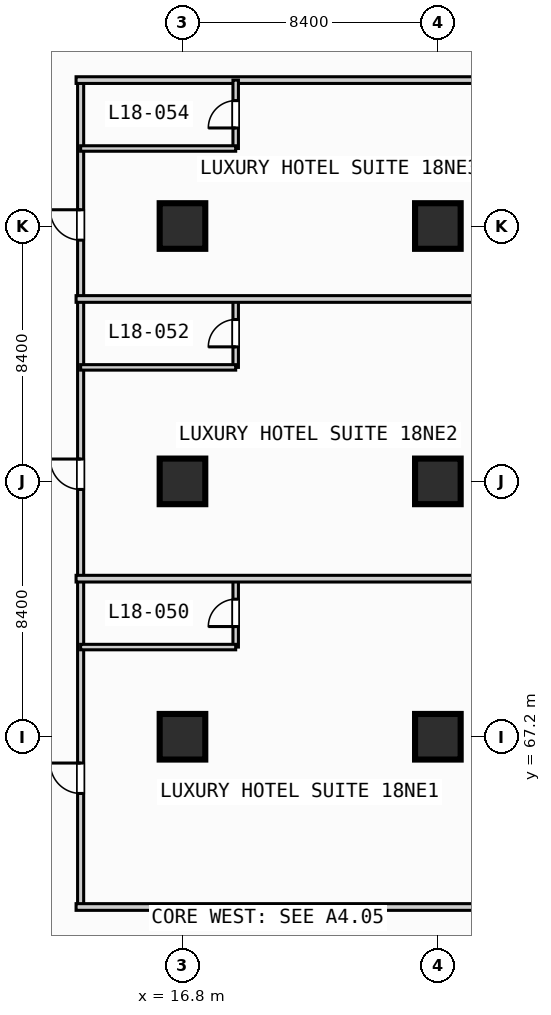
"""IFC4 building model, lengths in metres.
Left out: names, types, materials, properties, quantities, classifications, styles, units other than length and angle.
Written with IfcOpenShell. Run it as: python <this file> out.ifc"""

import sys

from ifc_helpers import new_model, si_unit, direction, frame, frame_2d, origin, origin_2d, place, context, subcontext, project, spatial, rectangle, extrude, element, fill, save


model = new_model("IFC4")
c1 = context("Model", 3, precision=1e-05, world=origin(), true_north=direction((0.0, 1.0)))
c2 = subcontext(c1, "Body", "Model", "MODEL_VIEW")
j1 = project(units=[si_unit("LENGTHUNIT", "METRE"), si_unit("PLANEANGLEUNIT", "RADIAN")], contexts=[c1])
p1 = place(None, origin())
s1 = spatial("IfcSite", under=j1, at=p1, CompositionType="ELEMENT")
p2 = place(p1, origin())
s2 = spatial("IfcBuilding", under=s1, at=p2, CompositionType="ELEMENT")
p3 = place(p2, frame((0.0, 0.0, 77.6)))
s3 = spatial("IfcBuildingStorey", under=s2, at=p3, CompositionType="ELEMENT", Elevation=77.6)
for number, where, z_axis, x_axis in (
    (1, (16.8, 67.2, 0.0), (0.0, 0.0, 1.0), (1.0, 0.0, 0.0)),
    (2, (16.8, 75.6, 0.0), (0.0, 0.0, 1.0), (1.0, 0.0, 0.0)),
    (3, (16.8, 84.0, 0.0), (0.0, 0.0, 1.0), (1.0, 0.0, 0.0)),
    (4, (25.2, 67.2, 0.0), (0.0, 0.0, 1.0), (1.0, 0.0, 0.0)),
    (5, (25.2, 75.6, 0.0), (0.0, 0.0, 1.0), (1.0, 0.0, 0.0)),
    (6, (25.2, 84.0, 0.0), (0.0, 0.0, 1.0), (1.0, 0.0, 0.0)),
):
    element("IfcColumn", number, at=place(p3, frame(where, z_axis=z_axis, x_axis=x_axis)), inside=s3, PredefinedType="COLUMN", context=c2, shape_type="SweptSolid", body=[
        extrude(rectangle(XDim=1.5, YDim=1.5, at=origin_2d()), origin(), (0.0, 0.0, 1.0), 3.8),
    ])
p4 = place(p3, frame((13.45, 61.6, 0.0), z_axis=(0.0, 0.0, 1.0), x_axis=(0.0, 1.0, 0.0)))
e7 = element("IfcWall", 7, at=p4, inside=s3, PredefinedType="PARTITIONING", context=c2, shape_type="SweptSolid", body=[
    extrude(rectangle(XDim=27.2, YDim=0.2, at=frame_2d((13.6, 0.0))), origin(), (0.0, 0.0, 1.0), 3.55),
])
p5 = place(p4, frame((3.735, 0.0, 0.0)))
e8 = element("IfcOpeningElement", 8, at=p5, cuts=e7, PredefinedType="OPENING", context=c2, shape_type="SweptSolid", body=[
    extrude(rectangle(XDim=1.0, YDim=2.15, at=frame_2d((0.5, 1.075))), frame((0.0, 0.11, 0.0), z_axis=(0.0, -1.0, 0.0), x_axis=(1.0, 0.0, 0.0)), (0.0, 0.0, 1.0), 0.22),
])
p6 = place(p4, frame((13.735, 0.0, 0.0)))
e9 = element("IfcOpeningElement", 9, at=p6, cuts=e7, PredefinedType="OPENING", context=c2, shape_type="SweptSolid", body=[
    extrude(rectangle(XDim=1.0, YDim=2.15, at=frame_2d((0.5, 1.075))), frame((0.0, 0.11, 0.0), z_axis=(0.0, -1.0, 0.0), x_axis=(1.0, 0.0, 0.0)), (0.0, 0.0, 1.0), 0.22),
])
p7 = place(p4, frame((21.935, 0.0, 0.0)))
e10 = element("IfcOpeningElement", 10, at=p7, cuts=e7, PredefinedType="OPENING", context=c2, shape_type="SweptSolid", body=[
    extrude(rectangle(XDim=1.0, YDim=2.15, at=frame_2d((0.5, 1.075))), frame((0.0, 0.11, 0.0), z_axis=(0.0, -1.0, 0.0), x_axis=(1.0, 0.0, 0.0)), (0.0, 0.0, 1.0), 0.22),
])
p8 = place(p3, frame((13.3, 61.6, 0.0), z_axis=(0.0, 0.0, 1.0), x_axis=(1.0, 0.0, 0.0)))
e11 = element("IfcWall", 11, at=p8, inside=s3, PredefinedType="PARTITIONING", context=c2, shape_type="SweptSolid", body=[
    extrude(rectangle(XDim=20.13, YDim=0.22, at=frame_2d((10.065, 0.0))), origin(), (0.0, 0.0, 1.0), 3.55),
])
p9 = place(p3, frame((18.55, 70.15, 0.0), z_axis=(0.0, 0.0, 1.0), x_axis=(0.0, 1.0, 0.0)))
e12 = element("IfcWall", 12, at=p9, inside=s3, PredefinedType="PLUMBINGWALL", context=c2, shape_type="SweptSolid", body=[
    extrude(rectangle(XDim=2.25, YDim=0.18, at=frame_2d((1.125, 0.0))), origin(), (0.0, 0.0, 1.0), 3.55),
])
p10 = place(p9, frame((0.675, 0.0, 0.0)))
e13 = element("IfcOpeningElement", 13, at=p10, cuts=e12, PredefinedType="OPENING", context=c2, shape_type="SweptSolid", body=[
    extrude(rectangle(XDim=0.9, YDim=2.1, at=frame_2d((0.45, 1.05))), frame((0.0, 0.1, 0.0), z_axis=(0.0, -1.0, 0.0), x_axis=(1.0, 0.0, 0.0)), (0.0, 0.0, 1.0), 0.2),
])
p11 = place(p3, frame((13.45, 70.15, 0.0), z_axis=(0.0, 0.0, 1.0), x_axis=(1.0, 0.0, 0.0)))
e14 = element("IfcWall", 14, at=p11, inside=s3, PredefinedType="PLUMBINGWALL", context=c2, shape_type="SweptSolid", body=[
    extrude(rectangle(XDim=5.1, YDim=0.18, at=frame_2d((2.55, 0.0))), origin(), (0.0, 0.0, 1.0), 3.55),
])
p12 = place(p3, frame((13.3, 72.4, 0.0), z_axis=(0.0, 0.0, 1.0), x_axis=(1.0, 0.0, 0.0)))
e15 = element("IfcWall", 15, at=p12, inside=s3, PredefinedType="PARTITIONING", context=c2, shape_type="SweptSolid", body=[
    extrude(rectangle(XDim=20.13, YDim=0.22, at=frame_2d((10.065, 0.0))), origin(), (0.0, 0.0, 1.0), 3.55),
])
p13 = place(p3, frame((18.55, 79.35, 0.0), z_axis=(0.0, 0.0, 1.0), x_axis=(0.0, 1.0, 0.0)))
e16 = element("IfcWall", 16, at=p13, inside=s3, PredefinedType="PLUMBINGWALL", context=c2, shape_type="SweptSolid", body=[
    extrude(rectangle(XDim=2.25, YDim=0.18, at=frame_2d((1.125, 0.0))), origin(), (0.0, 0.0, 1.0), 3.55),
])
p14 = place(p13, frame((0.675, 0.0, 0.0)))
e17 = element("IfcOpeningElement", 17, at=p14, cuts=e16, PredefinedType="OPENING", context=c2, shape_type="SweptSolid", body=[
    extrude(rectangle(XDim=0.9, YDim=2.1, at=frame_2d((0.45, 1.05))), frame((0.0, 0.1, 0.0), z_axis=(0.0, -1.0, 0.0), x_axis=(1.0, 0.0, 0.0)), (0.0, 0.0, 1.0), 0.2),
])
p15 = place(p3, frame((13.45, 79.35, 0.0), z_axis=(0.0, 0.0, 1.0), x_axis=(1.0, 0.0, 0.0)))
e18 = element("IfcWall", 18, at=p15, inside=s3, PredefinedType="PLUMBINGWALL", context=c2, shape_type="SweptSolid", body=[
    extrude(rectangle(XDim=5.1, YDim=0.18, at=frame_2d((2.55, 0.0))), origin(), (0.0, 0.0, 1.0), 3.55),
])
for number, where, z_axis, x_axis in (
    (19, (13.3, 81.6, 0.0), (0.0, 0.0, 1.0), (1.0, 0.0, 0.0)),
    (20, (13.3, 88.8, 0.0), (0.0, 0.0, 1.0), (1.0, 0.0, 0.0)),
):
    element("IfcWall", number, at=place(p3, frame(where, z_axis=z_axis, x_axis=x_axis)), inside=s3, PredefinedType="PARTITIONING", context=c2, shape_type="SweptSolid", body=[
        extrude(rectangle(XDim=20.13, YDim=0.22, at=frame_2d((10.065, 0.0))), origin(), (0.0, 0.0, 1.0), 3.55),
    ])
p16 = place(p3, frame((18.55, 86.55, 0.0), z_axis=(0.0, 0.0, 1.0), x_axis=(0.0, 1.0, 0.0)))
e21 = element("IfcWall", 21, at=p16, inside=s3, PredefinedType="PLUMBINGWALL", context=c2, shape_type="SweptSolid", body=[
    extrude(rectangle(XDim=2.25, YDim=0.18, at=frame_2d((1.125, 0.0))), origin(), (0.0, 0.0, 1.0), 3.55),
])
p17 = place(p16, frame((0.675, 0.0, 0.0)))
e22 = element("IfcOpeningElement", 22, at=p17, cuts=e21, PredefinedType="OPENING", context=c2, shape_type="SweptSolid", body=[
    extrude(rectangle(XDim=0.9, YDim=2.1, at=frame_2d((0.45, 1.05))), frame((0.0, 0.1, 0.0), z_axis=(0.0, -1.0, 0.0), x_axis=(1.0, 0.0, 0.0)), (0.0, 0.0, 1.0), 0.2),
])
p18 = place(p3, frame((13.45, 86.55, 0.0), z_axis=(0.0, 0.0, 1.0), x_axis=(1.0, 0.0, 0.0)))
e23 = element("IfcWall", 23, at=p18, inside=s3, PredefinedType="PLUMBINGWALL", context=c2, shape_type="SweptSolid", body=[
    extrude(rectangle(XDim=5.1, YDim=0.18, at=frame_2d((2.55, 0.0))), origin(), (0.0, 0.0, 1.0), 3.55),
])
p19 = place(p5, origin())
e24 = element("IfcDoor", 24, at=p19, inside=s3, OperationType="SINGLE_SWING_RIGHT", PredefinedType="DOOR", context=c2, shape_type="SweptSolid", body=[
    extrude(rectangle(XDim=1.0, YDim=2.15, at=frame_2d((0.5, 1.075))), frame((0.0, 0.025, 0.0), z_axis=(0.0, -1.0, 0.0), x_axis=(1.0, 0.0, 0.0)), (0.0, 0.0, 1.0), 0.05),
])
fill(e8, e24)
p20 = place(p6, origin())
e25 = element("IfcDoor", 25, at=p20, inside=s3, OperationType="SINGLE_SWING_RIGHT", PredefinedType="DOOR", context=c2, shape_type="SweptSolid", body=[
    extrude(rectangle(XDim=1.0, YDim=2.15, at=frame_2d((0.5, 1.075))), frame((0.0, 0.025, 0.0), z_axis=(0.0, -1.0, 0.0), x_axis=(1.0, 0.0, 0.0)), (0.0, 0.0, 1.0), 0.05),
])
fill(e9, e25)
p21 = place(p7, origin())
e26 = element("IfcDoor", 26, at=p21, inside=s3, OperationType="SINGLE_SWING_RIGHT", PredefinedType="DOOR", context=c2, shape_type="SweptSolid", body=[
    extrude(rectangle(XDim=1.0, YDim=2.15, at=frame_2d((0.5, 1.075))), frame((0.0, 0.025, 0.0), z_axis=(0.0, -1.0, 0.0), x_axis=(1.0, 0.0, 0.0)), (0.0, 0.0, 1.0), 0.05),
])
fill(e10, e26)
p22 = place(p10, origin())
e27 = element("IfcDoor", 27, at=p22, inside=s3, OperationType="SINGLE_SWING_LEFT", PredefinedType="DOOR", context=c2, shape_type="SweptSolid", body=[
    extrude(rectangle(XDim=0.9, YDim=2.1, at=frame_2d((0.45, 1.05))), frame((0.0, 0.025, 0.0), z_axis=(0.0, -1.0, 0.0), x_axis=(1.0, 0.0, 0.0)), (0.0, 0.0, 1.0), 0.05),
])
fill(e13, e27)
p23 = place(p14, origin())
e28 = element("IfcDoor", 28, at=p23, inside=s3, OperationType="SINGLE_SWING_LEFT", PredefinedType="DOOR", context=c2, shape_type="SweptSolid", body=[
    extrude(rectangle(XDim=0.9, YDim=2.1, at=frame_2d((0.45, 1.05))), frame((0.0, 0.025, 0.0), z_axis=(0.0, -1.0, 0.0), x_axis=(1.0, 0.0, 0.0)), (0.0, 0.0, 1.0), 0.05),
])
fill(e17, e28)
p24 = place(p17, origin())
e29 = element("IfcDoor", 29, at=p24, inside=s3, OperationType="SINGLE_SWING_LEFT", PredefinedType="DOOR", context=c2, shape_type="SweptSolid", body=[
    extrude(rectangle(XDim=0.9, YDim=2.1, at=frame_2d((0.45, 1.05))), frame((0.0, 0.025, 0.0), z_axis=(0.0, -1.0, 0.0), x_axis=(1.0, 0.0, 0.0)), (0.0, 0.0, 1.0), 0.05),
])
fill(e22, e29)
save(model, sys.argv[1])
